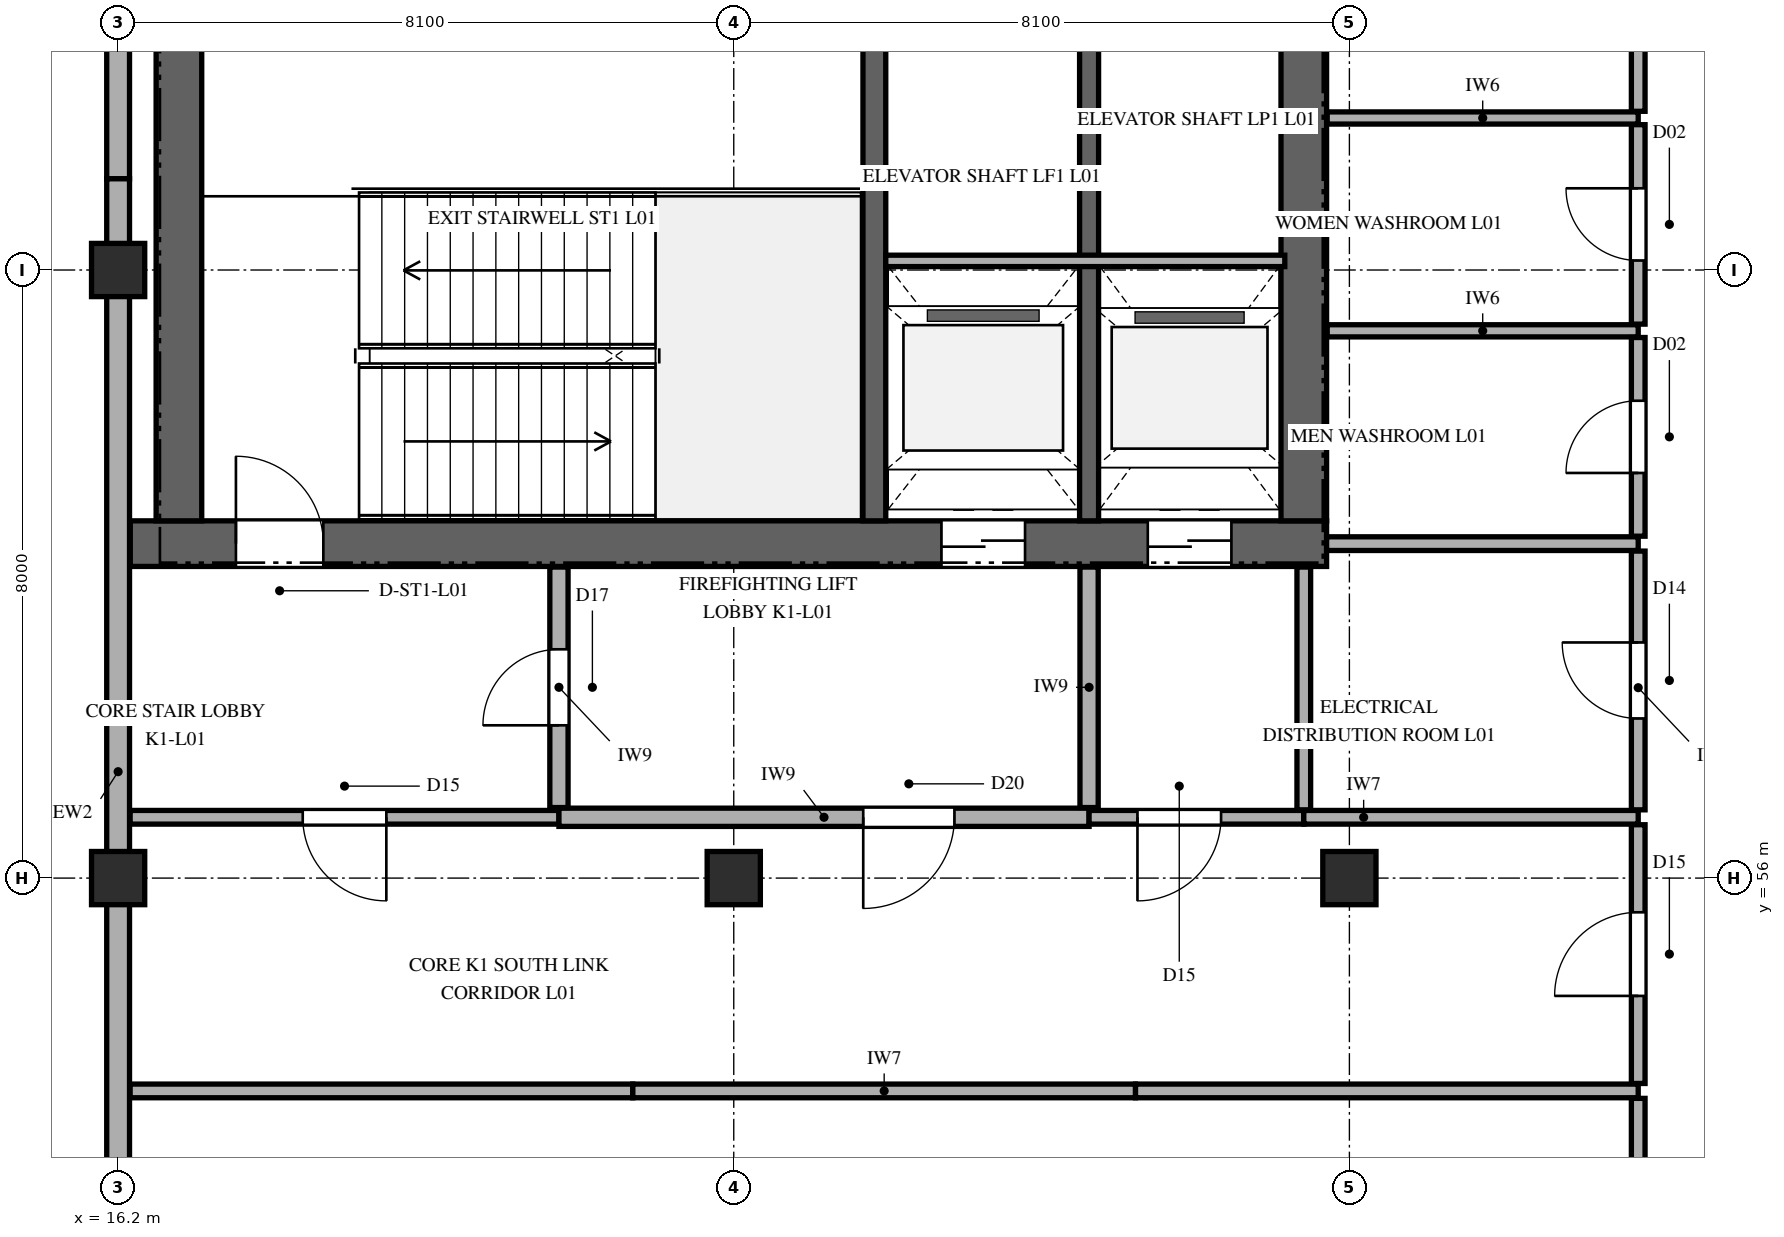
"""IFC4 building model, lengths in metres.
Left out: names, types, materials, properties, quantities, classifications, styles, units other than length and angle.
Written with IfcOpenShell. Run it as: python <this file> out.ifc"""

import sys

from ifc_helpers import new_model, si_unit, direction, frame, frame_2d, origin, origin_2d, place, context, subcontext, project, spatial, rectangle, extrude, element, fill, save


model = new_model("IFC4")
c1 = context("Model", 3, precision=1e-05, world=origin(), true_north=direction((0.0, 1.0)))
c2 = subcontext(c1, "Body", "Model", "MODEL_VIEW")
j1 = project(units=[si_unit("LENGTHUNIT", "METRE"), si_unit("PLANEANGLEUNIT", "RADIAN")], contexts=[c1])
p1 = place(None, origin())
s1 = spatial("IfcSite", under=j1, at=p1, CompositionType="ELEMENT")
p2 = place(p1, origin())
s2 = spatial("IfcBuilding", under=s1, at=p2, CompositionType="ELEMENT")
p3 = place(p2, frame((0.0, 0.0, 5.4)))
s3 = spatial("IfcBuildingStorey", under=s2, at=p3, CompositionType="ELEMENT", Elevation=5.4)
p4 = place(p3, frame((16.36, 60.4, 0.0), z_axis=(0.0, 0.0, 1.0), x_axis=(1.0, 0.0, 0.0)))
e1 = element("IfcWall", 1, at=p4, inside=s3, PredefinedType="SHEAR", context=c2, shape_type="SweptSolid", body=[
    extrude(rectangle(XDim=15.74, YDim=0.6, at=frame_2d((7.87, 0.0))), origin(), (0.0, 0.0, 1.0), 4.8),
])
p5 = place(p4, frame((1.39, 0.0, 0.0)))
e2 = element("IfcOpeningElement", 2, at=p5, cuts=e1, PredefinedType="OPENING", context=c2, shape_type="SweptSolid", body=[
    extrude(rectangle(XDim=1.15, YDim=2.25, at=frame_2d((0.575, 1.125))), frame((0.0, 0.31, 0.0), z_axis=(0.0, -1.0, 0.0), x_axis=(1.0, 0.0, 0.0)), (0.0, 0.0, 1.0), 0.62),
])
p6 = place(p4, frame((10.673, 0.0, 0.0)))
e3 = element("IfcOpeningElement", 3, at=p6, cuts=e1, PredefinedType="OPENING", context=c2, shape_type="SweptSolid", body=[
    extrude(rectangle(XDim=1.1, YDim=2.2, at=frame_2d((0.55, 1.1))), frame((0.0, 0.31, 0.0), z_axis=(0.0, -1.0, 0.0), x_axis=(1.0, 0.0, 0.0)), (0.0, 0.0, 1.0), 0.62),
])
p7 = place(p4, frame((13.387, 0.0, 0.0)))
e4 = element("IfcOpeningElement", 4, at=p7, cuts=e1, PredefinedType="OPENING", context=c2, shape_type="SweptSolid", body=[
    extrude(rectangle(XDim=1.1, YDim=2.2, at=frame_2d((0.55, 1.1))), frame((0.0, 0.31, 0.0), z_axis=(0.0, -1.0, 0.0), x_axis=(1.0, 0.0, 0.0)), (0.0, 0.0, 1.0), 0.62),
])
for number, where, z_axis, x_axis in (
    (5, (17.0, 60.7, 0.0), (0.0, 0.0, 1.0), (0.0, 1.0, 0.0)),
    (6, (31.8, 60.7, 0.0), (0.0, 0.0, 1.0), (0.0, 1.0, 0.0)),
):
    element("IfcWall", number, at=place(p3, frame(where, z_axis=z_axis, x_axis=x_axis)), inside=s3, PredefinedType="SHEAR", context=c2, shape_type="SweptSolid", body=[
        extrude(rectangle(XDim=7.8, YDim=0.6, at=frame_2d((3.9, 0.0))), origin(), (0.0, 0.0, 1.0), 4.8),
    ])
p8 = place(p3, frame((26.15, 60.7, 0.0), z_axis=(0.0, 0.0, 1.0), x_axis=(0.0, 1.0, 0.0)))
e7 = element("IfcWall", 7, at=p8, inside=s3, PredefinedType="SHEAR", context=c2, shape_type="SweptSolid", body=[
    extrude(rectangle(XDim=7.8, YDim=0.3, at=frame_2d((3.9, 0.0))), origin(), (0.0, 0.0, 1.0), 4.8),
])
p9 = place(p3, frame((28.975, 60.7, 0.0), z_axis=(0.0, 0.0, 1.0), x_axis=(0.0, 1.0, 0.0)))
e8 = element("IfcWall", 8, at=p9, inside=s3, PredefinedType="SHEAR", context=c2, shape_type="SweptSolid", body=[
    extrude(rectangle(XDim=7.8, YDim=0.25, at=frame_2d((3.9, 0.0))), origin(), (0.0, 0.0, 1.0), 4.8),
])
for number, where, z_axis, x_axis in (
    (9, (16.2, 56.0, 0.0), (0.0, 0.0, 1.0), (1.0, 0.0, 0.0)),
    (10, (16.2, 64.0, 0.0), (0.0, 0.0, 1.0), (1.0, 0.0, 0.0)),
    (11, (24.3, 56.0, 0.0), (0.0, 0.0, 1.0), (1.0, 0.0, 0.0)),
    (12, (32.4, 56.0, 0.0), (0.0, 0.0, 1.0), (1.0, 0.0, 0.0)),
):
    element("IfcColumn", number, at=place(p3, frame(where, z_axis=z_axis, x_axis=x_axis)), inside=s3, PredefinedType="COLUMN", context=c2, shape_type="SweptSolid", body=[
        extrude(rectangle(XDim=0.7, YDim=0.7, at=origin_2d()), origin(), (0.0, 0.0, 1.0), 4.8),
    ])
p10 = place(p3, frame((16.2, 80.8, 0.0), z_axis=(0.0, 0.0, 1.0), x_axis=(0.0, -1.0, 0.0)))
e13 = element("IfcWall", 13, at=p10, inside=s3, PredefinedType="SOLIDWALL", context=c2, shape_type="SweptSolid", body=[
    extrude(rectangle(XDim=15.6, YDim=0.3, at=frame_2d((7.8, 0.0))), origin(), (0.0, 0.0, 1.0), 3.912),
])
p11 = place(p10, frame((4.5, 0.0, 0.95)))
e14 = element("IfcOpeningElement", 14, at=p11, cuts=e13, PredefinedType="OPENING", context=c2, shape_type="SweptSolid", body=[
    extrude(rectangle(XDim=1.35, YDim=1.8, at=frame_2d((0.675, 0.9))), frame((0.0, 0.16, 0.0), z_axis=(0.0, -1.0, 0.0), x_axis=(1.0, 0.0, 0.0)), (0.0, 0.0, 1.0), 0.32),
])
p12 = place(p3, frame((16.2, 65.2, 0.0), z_axis=(0.0, 0.0, 1.0), x_axis=(0.0, -1.0, 0.0)))
e15 = element("IfcWall", 15, at=p12, inside=s3, PredefinedType="SOLIDWALL", context=c2, shape_type="SweptSolid", body=[
    extrude(rectangle(XDim=15.6, YDim=0.3, at=frame_2d((7.8, 0.0))), origin(), (0.0, 0.0, 1.0), 3.912),
])
p13 = place(p3, frame((26.3, 64.12, 0.0), z_axis=(0.0, 0.0, 1.0), x_axis=(1.0, 0.0, 0.0)))
e16 = element("IfcWall", 16, at=p13, inside=s3, PredefinedType="PARTITIONING", context=c2, shape_type="SweptSolid", body=[
    extrude(rectangle(XDim=5.25, YDim=0.15, at=frame_2d((2.625, 0.0))), origin(), (0.0, 0.0, 1.0), 4.52),
])
for number, where, z_axis, x_axis in (
    (17, (16.358, 53.2, 0.0), (0.0, 0.0, 1.0), (1.0, 0.0, 0.0)),
    (18, (22.972, 53.2, 0.0), (0.0, 0.0, 1.0), (1.0, 0.0, 0.0)),
    (19, (29.586, 53.2, 0.0), (0.0, 0.0, 1.0), (1.0, 0.0, 0.0)),
):
    element("IfcWall", number, at=place(p3, frame(where, z_axis=z_axis, x_axis=x_axis)), inside=s3, PredefinedType="PARTITIONING", context=c2, shape_type="SweptSolid", body=[
        extrude(rectangle(XDim=6.614, YDim=0.18, at=frame_2d((3.307, 0.0))), origin(), (0.0, 0.0, 1.0), 4.52),
    ])
p14 = place(p3, frame((16.358, 56.8, 0.0), z_axis=(0.0, 0.0, 1.0), x_axis=(1.0, 0.0, 0.0)))
e20 = element("IfcWall", 20, at=p14, inside=s3, PredefinedType="PARTITIONING", context=c2, shape_type="SweptSolid", body=[
    extrude(rectangle(XDim=5.642, YDim=0.18, at=frame_2d((2.821, 0.0))), origin(), (0.0, 0.0, 1.0), 4.52),
])
p15 = place(p14, frame((2.271, 0.0, 0.0)))
e21 = element("IfcOpeningElement", 21, at=p15, cuts=e20, PredefinedType="OPENING", context=c2, shape_type="SweptSolid", body=[
    extrude(rectangle(XDim=1.1, YDim=2.2, at=frame_2d((0.55, 1.1))), frame((0.0, 0.1, 0.0), z_axis=(0.0, -1.0, 0.0), x_axis=(1.0, 0.0, 0.0)), (0.0, 0.0, 1.0), 0.2),
])
p16 = place(p3, frame((22.0, 56.8, 0.0), z_axis=(0.0, 0.0, 1.0), x_axis=(1.0, 0.0, 0.0)))
e22 = element("IfcWall", 22, at=p16, inside=s3, PredefinedType="PARTITIONING", context=c2, shape_type="SweptSolid", body=[
    extrude(rectangle(XDim=6.975, YDim=0.24, at=frame_2d((3.488, 0.0))), origin(), (0.0, 0.0, 1.0), 4.52),
])
p17 = place(p16, frame((4.003, 0.0, 0.0)))
e23 = element("IfcOpeningElement", 23, at=p17, cuts=e22, PredefinedType="OPENING", context=c2, shape_type="SweptSolid", body=[
    extrude(rectangle(XDim=1.2, YDim=2.3, at=frame_2d((0.6, 1.15))), frame((0.0, 0.13, 0.0), z_axis=(0.0, -1.0, 0.0), x_axis=(1.0, 0.0, 0.0)), (0.0, 0.0, 1.0), 0.26),
])
p18 = place(p3, frame((28.975, 56.8, 0.0), z_axis=(0.0, 0.0, 1.0), x_axis=(1.0, 0.0, 0.0)))
e24 = element("IfcWall", 24, at=p18, inside=s3, PredefinedType="PARTITIONING", context=c2, shape_type="SweptSolid", body=[
    extrude(rectangle(XDim=2.825, YDim=0.18, at=frame_2d((1.413, 0.0))), origin(), (0.0, 0.0, 1.0), 4.52),
])
p19 = place(p18, frame((0.636, 0.0, 0.0)))
e25 = element("IfcOpeningElement", 25, at=p19, cuts=e24, PredefinedType="OPENING", context=c2, shape_type="SweptSolid", body=[
    extrude(rectangle(XDim=1.1, YDim=2.2, at=frame_2d((0.55, 1.1))), frame((0.0, 0.1, 0.0), z_axis=(0.0, -1.0, 0.0), x_axis=(1.0, 0.0, 0.0)), (0.0, 0.0, 1.0), 0.2),
])
p20 = place(p3, frame((31.8, 56.8, 0.0), z_axis=(0.0, 0.0, 1.0), x_axis=(1.0, 0.0, 0.0)))
e26 = element("IfcWall", 26, at=p20, inside=s3, PredefinedType="PARTITIONING", context=c2, shape_type="SweptSolid", body=[
    extrude(rectangle(XDim=4.4, YDim=0.18, at=frame_2d((2.2, 0.0))), origin(), (0.0, 0.0, 1.0), 4.52),
])
p21 = place(p3, frame((32.1, 60.4, 0.0), z_axis=(0.0, 0.0, 1.0), x_axis=(1.0, 0.0, 0.0)))
e27 = element("IfcWall", 27, at=p21, inside=s3, PredefinedType="PARTITIONING", context=c2, shape_type="SweptSolid", body=[
    extrude(rectangle(XDim=4.1, YDim=0.18, at=frame_2d((2.05, 0.0))), origin(), (0.0, 0.0, 1.0), 4.52),
])
for number, where, z_axis, x_axis in (
    (28, (32.108, 63.2, 0.0), (0.0, 0.0, 1.0), (1.0, 0.0, 0.0)),
    (29, (32.108, 66.0, 0.0), (0.0, 0.0, 1.0), (1.0, 0.0, 0.0)),
):
    element("IfcWall", number, at=place(p3, frame(where, z_axis=z_axis, x_axis=x_axis)), inside=s3, PredefinedType="PARTITIONING", context=c2, shape_type="SweptSolid", body=[
        extrude(rectangle(XDim=4.092, YDim=0.16, at=frame_2d((2.046, 0.0))), origin(), (0.0, 0.0, 1.0), 4.52),
    ])
p22 = place(p3, frame((22.0, 56.928, 0.0), z_axis=(0.0, 0.0, 1.0), x_axis=(0.0, 1.0, 0.0)))
e30 = element("IfcWall", 30, at=p22, inside=s3, PredefinedType="PARTITIONING", context=c2, shape_type="SweptSolid", body=[
    extrude(rectangle(XDim=3.164, YDim=0.24, at=frame_2d((1.582, 0.0))), origin(), (0.0, 0.0, 1.0), 4.52),
])
p23 = place(p22, frame((1.082, 0.0, 0.0)))
e31 = element("IfcOpeningElement", 31, at=p23, cuts=e30, PredefinedType="OPENING", context=c2, shape_type="SweptSolid", body=[
    extrude(rectangle(XDim=1.0, YDim=2.2, at=frame_2d((0.5, 1.1))), frame((0.0, 0.13, 0.0), z_axis=(0.0, -1.0, 0.0), x_axis=(1.0, 0.0, 0.0)), (0.0, 0.0, 1.0), 0.26),
])
p24 = place(p3, frame((28.975, 56.928, 0.0), z_axis=(0.0, 0.0, 1.0), x_axis=(0.0, 1.0, 0.0)))
e32 = element("IfcWall", 32, at=p24, inside=s3, PredefinedType="PARTITIONING", context=c2, shape_type="SweptSolid", body=[
    extrude(rectangle(XDim=3.164, YDim=0.24, at=frame_2d((1.582, 0.0))), origin(), (0.0, 0.0, 1.0), 4.52),
])
p25 = place(p3, frame((31.8, 56.898, 0.0), z_axis=(0.0, 0.0, 1.0), x_axis=(0.0, 1.0, 0.0)))
e33 = element("IfcWall", 33, at=p25, inside=s3, PredefinedType="PARTITIONING", context=c2, shape_type="SweptSolid", body=[
    extrude(rectangle(XDim=3.194, YDim=0.18, at=frame_2d((1.597, 0.0))), origin(), (0.0, 0.0, 1.0), 4.52),
])
p26 = place(p3, frame((36.2, 34.098, 0.0), z_axis=(0.0, 0.0, 1.0), x_axis=(0.0, 1.0, 0.0)))
e34 = element("IfcWall", 34, at=p26, inside=s3, PredefinedType="PARTITIONING", context=c2, shape_type="SweptSolid", body=[
    extrude(rectangle(XDim=19.004, YDim=0.18, at=frame_2d((9.502, 0.0))), origin(), (0.0, 0.0, 1.0), 4.105),
])
p27 = place(p26, frame((8.952, 0.0, 0.0)))
e35 = element("IfcOpeningElement", 35, at=p27, cuts=e34, PredefinedType="OPENING", context=c2, shape_type="SweptSolid", body=[
    extrude(rectangle(XDim=1.1, YDim=2.2, at=frame_2d((0.55, 1.1))), frame((0.0, 0.1, 0.0), z_axis=(0.0, -1.0, 0.0), x_axis=(1.0, 0.0, 0.0)), (0.0, 0.0, 1.0), 0.2),
])
p28 = place(p3, frame((36.2, 53.298, 0.0), z_axis=(0.0, 0.0, 1.0), x_axis=(0.0, 1.0, 0.0)))
e36 = element("IfcWall", 36, at=p28, inside=s3, PredefinedType="PARTITIONING", context=c2, shape_type="SweptSolid", body=[
    extrude(rectangle(XDim=3.404, YDim=0.18, at=frame_2d((1.702, 0.0))), origin(), (0.0, 0.0, 1.0), 4.158),
])
p29 = place(p28, frame((1.152, 0.0, 0.0)))
e37 = element("IfcOpeningElement", 37, at=p29, cuts=e36, PredefinedType="OPENING", context=c2, shape_type="SweptSolid", body=[
    extrude(rectangle(XDim=1.1, YDim=2.2, at=frame_2d((0.55, 1.1))), frame((0.0, 0.1, 0.0), z_axis=(0.0, -1.0, 0.0), x_axis=(1.0, 0.0, 0.0)), (0.0, 0.0, 1.0), 0.2),
])
p30 = place(p3, frame((36.2, 56.898, 0.0), z_axis=(0.0, 0.0, 1.0), x_axis=(0.0, 1.0, 0.0)))
e38 = element("IfcWall", 38, at=p30, inside=s3, PredefinedType="PARTITIONING", context=c2, shape_type="SweptSolid", body=[
    extrude(rectangle(XDim=3.404, YDim=0.18, at=frame_2d((1.702, 0.0))), origin(), (0.0, 0.0, 1.0), 4.52),
])
p31 = place(p30, frame((1.202, 0.0, 0.0)))
e39 = element("IfcOpeningElement", 39, at=p31, cuts=e38, PredefinedType="OPENING", context=c2, shape_type="SweptSolid", body=[
    extrude(rectangle(XDim=1.0, YDim=2.15, at=frame_2d((0.5, 1.075))), frame((0.0, 0.1, 0.0), z_axis=(0.0, -1.0, 0.0), x_axis=(1.0, 0.0, 0.0)), (0.0, 0.0, 1.0), 0.2),
])
p32 = place(p3, frame((36.2, 60.498, 0.0), z_axis=(0.0, 0.0, 1.0), x_axis=(0.0, 1.0, 0.0)))
e40 = element("IfcWall", 40, at=p32, inside=s3, PredefinedType="PARTITIONING", context=c2, shape_type="SweptSolid", body=[
    extrude(rectangle(XDim=2.614, YDim=0.18, at=frame_2d((1.307, 0.0))), origin(), (0.0, 0.0, 1.0), 4.52),
])
p33 = place(p32, frame((0.832, 0.0, 0.0)))
e41 = element("IfcOpeningElement", 41, at=p33, cuts=e40, PredefinedType="OPENING", context=c2, shape_type="SweptSolid", body=[
    extrude(rectangle(XDim=0.95, YDim=2.1, at=frame_2d((0.475, 1.05))), frame((0.0, 0.1, 0.0), z_axis=(0.0, -1.0, 0.0), x_axis=(1.0, 0.0, 0.0)), (0.0, 0.0, 1.0), 0.2),
])
p34 = place(p3, frame((36.2, 63.288, 0.0), z_axis=(0.0, 0.0, 1.0), x_axis=(0.0, 1.0, 0.0)))
e42 = element("IfcWall", 42, at=p34, inside=s3, PredefinedType="PARTITIONING", context=c2, shape_type="SweptSolid", body=[
    extrude(rectangle(XDim=2.624, YDim=0.18, at=frame_2d((1.312, 0.0))), origin(), (0.0, 0.0, 1.0), 4.52),
])
p35 = place(p34, frame((0.837, 0.0, 0.0)))
e43 = element("IfcOpeningElement", 43, at=p35, cuts=e42, PredefinedType="OPENING", context=c2, shape_type="SweptSolid", body=[
    extrude(rectangle(XDim=0.95, YDim=2.1, at=frame_2d((0.475, 1.05))), frame((0.0, 0.1, 0.0), z_axis=(0.0, -1.0, 0.0), x_axis=(1.0, 0.0, 0.0)), (0.0, 0.0, 1.0), 0.2),
])
p36 = place(p3, frame((36.2, 66.088, 0.0), z_axis=(0.0, 0.0, 1.0), x_axis=(0.0, 1.0, 0.0)))
e44 = element("IfcWall", 44, at=p36, inside=s3, PredefinedType="PARTITIONING", context=c2, shape_type="SweptSolid", body=[
    extrude(rectangle(XDim=2.624, YDim=0.18, at=frame_2d((1.312, 0.0))), origin(), (0.0, 0.0, 1.0), 4.52),
])
p37 = place(p36, frame((0.812, 0.0, 0.0)))
e45 = element("IfcOpeningElement", 45, at=p37, cuts=e44, PredefinedType="OPENING", context=c2, shape_type="SweptSolid", body=[
    extrude(rectangle(XDim=1.0, YDim=2.15, at=frame_2d((0.5, 1.075))), frame((0.0, 0.1, 0.0), z_axis=(0.0, -1.0, 0.0), x_axis=(1.0, 0.0, 0.0)), (0.0, 0.0, 1.0), 0.2),
])
p38 = place(p5, origin())
e46 = element("IfcDoor", 46, at=p38, inside=s3, OperationType="SINGLE_SWING_LEFT", PredefinedType="DOOR", context=c2, shape_type="SweptSolid", body=[
    extrude(rectangle(XDim=1.15, YDim=2.25, at=frame_2d((0.575, 1.125))), frame((0.0, 0.025, 0.0), z_axis=(0.0, -1.0, 0.0), x_axis=(1.0, 0.0, 0.0)), (0.0, 0.0, 1.0), 0.05),
])
fill(e2, e46)
p39 = place(p6, frame((1.1, 0.0, 0.0), z_axis=(0.0, 0.0, 1.0), x_axis=(-1.0, 0.0, 0.0)))
e47 = element("IfcDoor", 47, at=p39, inside=s3, OperationType="DOUBLE_DOOR_SLIDING", PredefinedType="DOOR", context=c2, shape_type="SweptSolid", body=[
    extrude(rectangle(XDim=1.1, YDim=2.2, at=frame_2d((0.55, 1.1))), frame((0.0, 0.025, 0.0), z_axis=(0.0, -1.0, 0.0), x_axis=(1.0, 0.0, 0.0)), (0.0, 0.0, 1.0), 0.05),
])
fill(e3, e47)
p40 = place(p7, frame((1.1, 0.0, 0.0), z_axis=(0.0, 0.0, 1.0), x_axis=(-1.0, 0.0, 0.0)))
e48 = element("IfcDoor", 48, at=p40, inside=s3, OperationType="DOUBLE_DOOR_SLIDING", PredefinedType="DOOR", context=c2, shape_type="SweptSolid", body=[
    extrude(rectangle(XDim=1.1, YDim=2.2, at=frame_2d((0.55, 1.1))), frame((0.0, 0.025, 0.0), z_axis=(0.0, -1.0, 0.0), x_axis=(1.0, 0.0, 0.0)), (0.0, 0.0, 1.0), 0.05),
])
fill(e4, e48)
p41 = place(p15, frame((1.1, 0.0, 0.0), z_axis=(0.0, 0.0, 1.0), x_axis=(-1.0, 0.0, 0.0)))
e49 = element("IfcDoor", 49, at=p41, inside=s3, OperationType="SINGLE_SWING_RIGHT", PredefinedType="DOOR", context=c2, shape_type="SweptSolid", body=[
    extrude(rectangle(XDim=1.1, YDim=2.2, at=frame_2d((0.55, 1.1))), frame((0.0, 0.025, 0.0), z_axis=(0.0, -1.0, 0.0), x_axis=(1.0, 0.0, 0.0)), (0.0, 0.0, 1.0), 0.05),
])
fill(e21, e49)
p42 = place(p17, frame((1.2, 0.0, 0.0), z_axis=(0.0, 0.0, 1.0), x_axis=(-1.0, 0.0, 0.0)))
e50 = element("IfcDoor", 50, at=p42, inside=s3, OperationType="SINGLE_SWING_LEFT", PredefinedType="DOOR", context=c2, shape_type="SweptSolid", body=[
    extrude(rectangle(XDim=1.2, YDim=2.3, at=frame_2d((0.6, 1.15))), frame((0.0, 0.025, 0.0), z_axis=(0.0, -1.0, 0.0), x_axis=(1.0, 0.0, 0.0)), (0.0, 0.0, 1.0), 0.05),
])
fill(e23, e50)
p43 = place(p19, frame((1.1, 0.0, 0.0), z_axis=(0.0, 0.0, 1.0), x_axis=(-1.0, 0.0, 0.0)))
e51 = element("IfcDoor", 51, at=p43, inside=s3, OperationType="SINGLE_SWING_LEFT", PredefinedType="DOOR", context=c2, shape_type="SweptSolid", body=[
    extrude(rectangle(XDim=1.1, YDim=2.2, at=frame_2d((0.55, 1.1))), frame((0.0, 0.025, 0.0), z_axis=(0.0, -1.0, 0.0), x_axis=(1.0, 0.0, 0.0)), (0.0, 0.0, 1.0), 0.05),
])
fill(e25, e51)
p44 = place(p23, origin())
e52 = element("IfcDoor", 52, at=p44, inside=s3, OperationType="SINGLE_SWING_LEFT", PredefinedType="DOOR", context=c2, shape_type="SweptSolid", body=[
    extrude(rectangle(XDim=1.0, YDim=2.2, at=frame_2d((0.5, 1.1))), frame((0.0, 0.025, 0.0), z_axis=(0.0, -1.0, 0.0), x_axis=(1.0, 0.0, 0.0)), (0.0, 0.0, 1.0), 0.05),
])
fill(e31, e52)
p45 = place(p29, origin())
e53 = element("IfcDoor", 53, at=p45, inside=s3, OperationType="SINGLE_SWING_LEFT", PredefinedType="DOOR", context=c2, shape_type="SweptSolid", body=[
    extrude(rectangle(XDim=1.1, YDim=2.2, at=frame_2d((0.55, 1.1))), frame((0.0, 0.025, 0.0), z_axis=(0.0, -1.0, 0.0), x_axis=(1.0, 0.0, 0.0)), (0.0, 0.0, 1.0), 0.05),
])
fill(e37, e53)
p46 = place(p31, origin())
e54 = element("IfcDoor", 54, at=p46, inside=s3, OperationType="SINGLE_SWING_RIGHT", PredefinedType="DOOR", context=c2, shape_type="SweptSolid", body=[
    extrude(rectangle(XDim=1.0, YDim=2.15, at=frame_2d((0.5, 1.075))), frame((0.0, 0.025, 0.0), z_axis=(0.0, -1.0, 0.0), x_axis=(1.0, 0.0, 0.0)), (0.0, 0.0, 1.0), 0.05),
])
fill(e39, e54)
p47 = place(p33, origin())
e55 = element("IfcDoor", 55, at=p47, inside=s3, OperationType="SINGLE_SWING_LEFT", PredefinedType="DOOR", context=c2, shape_type="SweptSolid", body=[
    extrude(rectangle(XDim=0.95, YDim=2.1, at=frame_2d((0.475, 1.05))), frame((0.0, 0.025, 0.0), z_axis=(0.0, -1.0, 0.0), x_axis=(1.0, 0.0, 0.0)), (0.0, 0.0, 1.0), 0.05),
])
fill(e41, e55)
p48 = place(p35, origin())
e56 = element("IfcDoor", 56, at=p48, inside=s3, OperationType="SINGLE_SWING_RIGHT", PredefinedType="DOOR", context=c2, shape_type="SweptSolid", body=[
    extrude(rectangle(XDim=0.95, YDim=2.1, at=frame_2d((0.475, 1.05))), frame((0.0, 0.025, 0.0), z_axis=(0.0, -1.0, 0.0), x_axis=(1.0, 0.0, 0.0)), (0.0, 0.0, 1.0), 0.05),
])
fill(e43, e56)
save(model, sys.argv[1])
